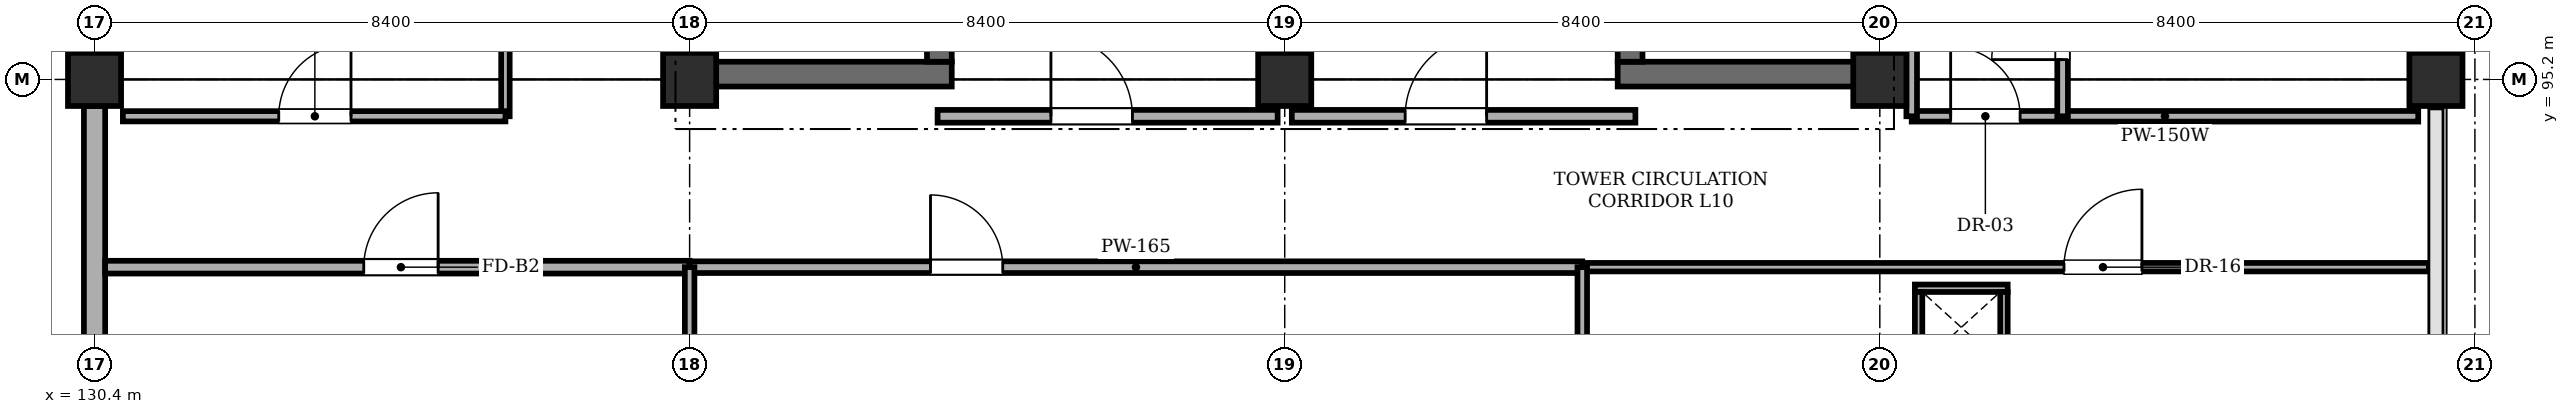
"""IFC4 building model, lengths in metres.
Left out: names, types, materials, properties, quantities, classifications, styles, units other than length and angle.
Written with IfcOpenShell. Run it as: python <this file> out.ifc"""

import sys

from ifc_helpers import new_model, si_unit, direction, frame, frame_2d, origin, origin_2d, place, context, subcontext, project, spatial, rectangle, extrude, element, fill, save


model = new_model("IFC4")
c1 = context("Model", 3, precision=1e-05, world=origin(), true_north=direction((0.0, 1.0)))
c2 = subcontext(c1, "Body", "Model", "MODEL_VIEW")
j1 = project(units=[si_unit("LENGTHUNIT", "METRE"), si_unit("PLANEANGLEUNIT", "RADIAN")], contexts=[c1])
p1 = place(None, origin())
s1 = spatial("IfcSite", under=j1, at=p1, CompositionType="ELEMENT")
p2 = place(p1, origin())
s2 = spatial("IfcBuilding", under=s1, at=p2, CompositionType="ELEMENT")
p3 = place(p2, frame((0.0, 0.0, 40.2)))
s3 = spatial("IfcBuildingStorey", under=s2, at=p3, CompositionType="ELEMENT", Elevation=40.2)
for number, where, z_axis, x_axis in (
    (1, (130.4, 95.2, 0.0), (0.0, 0.0, 1.0), (1.0, 0.0, 0.0)),
    (2, (138.8, 95.2, 0.0), (0.0, 0.0, 1.0), (1.0, 0.0, 0.0)),
    (3, (147.2, 95.2, 0.0), (0.0, 0.0, 1.0), (1.0, 0.0, 0.0)),
    (4, (155.6, 95.2, 0.0), (0.0, 0.0, 1.0), (1.0, 0.0, 0.0)),
    (5, (163.45, 95.2, 0.0), (0.0, 0.0, 1.0), (1.0, 0.0, 0.0)),
):
    element("IfcColumn", number, at=place(p3, frame(where, z_axis=z_axis, x_axis=x_axis)), inside=s3, PredefinedType="COLUMN", context=c2, shape_type="SweptSolid", body=[
        extrude(rectangle(XDim=0.75, YDim=0.75, at=origin_2d()), origin(), (0.0, 0.0, 1.0), 4.0),
    ])
p4 = place(p3, frame((138.7, 95.275, 0.0), z_axis=(0.0, 0.0, 1.0), x_axis=(1.0, 0.0, 0.0)))
e6 = element("IfcWall", 6, at=p4, inside=s3, PredefinedType="SHEAR", context=c2, shape_type="SweptSolid", body=[
    extrude(rectangle(XDim=3.8, YDim=0.35, at=frame_2d((1.9, 0.0))), origin(), (0.0, 0.0, 1.0), 4.0),
])
p5 = place(p3, frame((138.875, 95.45, 0.0), z_axis=(0.0, 0.0, 1.0), x_axis=(0.0, 1.0, 0.0)))
e7 = element("IfcWall", 7, at=p5, inside=s3, PredefinedType="SHEAR", context=c2, shape_type="SweptSolid", body=[
    extrude(rectangle(XDim=7.9, YDim=0.35, at=frame_2d((3.95, 0.0))), origin(), (0.0, 0.0, 1.0), 4.0),
])
p6 = place(p3, frame((142.325, 95.45, 0.0), z_axis=(0.0, 0.0, 1.0), x_axis=(0.0, 1.0, 0.0)))
e8 = element("IfcWall", 8, at=p6, inside=s3, PredefinedType="SHEAR", context=c2, shape_type="SweptSolid", body=[
    extrude(rectangle(XDim=7.9, YDim=0.35, at=frame_2d((3.95, 0.0))), origin(), (0.0, 0.0, 1.0), 4.0),
])
p7 = place(p6, frame((0.22, 0.0, 0.0)))
e9 = element("IfcOpeningElement", 9, at=p7, cuts=e8, PredefinedType="OPENING", context=c2, shape_type="SweptSolid", body=[
    extrude(rectangle(XDim=1.15, YDim=2.15, at=frame_2d((0.575, 1.075))), frame((0.0, 0.185, 0.0), z_axis=(0.0, -1.0, 0.0), x_axis=(1.0, 0.0, 0.0)), (0.0, 0.0, 1.0), 0.37),
])
p8 = place(p3, frame((151.9, 95.275, 0.0), z_axis=(0.0, 0.0, 1.0), x_axis=(1.0, 0.0, 0.0)))
e10 = element("IfcWall", 10, at=p8, inside=s3, PredefinedType="SHEAR", context=c2, shape_type="SweptSolid", body=[
    extrude(rectangle(XDim=3.8, YDim=0.35, at=frame_2d((1.9, 0.0))), origin(), (0.0, 0.0, 1.0), 4.0),
])
p9 = place(p3, frame((152.075, 95.45, 0.0), z_axis=(0.0, 0.0, 1.0), x_axis=(0.0, 1.0, 0.0)))
e11 = element("IfcWall", 11, at=p9, inside=s3, PredefinedType="SHEAR", context=c2, shape_type="SweptSolid", body=[
    extrude(rectangle(XDim=7.9, YDim=0.35, at=frame_2d((3.95, 0.0))), origin(), (0.0, 0.0, 1.0), 4.0),
])
p10 = place(p9, frame((0.35, 0.0, 0.0)))
e12 = element("IfcOpeningElement", 12, at=p10, cuts=e11, PredefinedType="OPENING", context=c2, shape_type="SweptSolid", body=[
    extrude(rectangle(XDim=1.15, YDim=2.15, at=frame_2d((0.575, 1.075))), frame((0.0, 0.185, 0.0), z_axis=(0.0, -1.0, 0.0), x_axis=(1.0, 0.0, 0.0)), (0.0, 0.0, 1.0), 0.37),
])
p11 = place(p3, frame((155.525, 95.45, 0.0), z_axis=(0.0, 0.0, 1.0), x_axis=(0.0, 1.0, 0.0)))
e13 = element("IfcWall", 13, at=p11, inside=s3, PredefinedType="SHEAR", context=c2, shape_type="SweptSolid", body=[
    extrude(rectangle(XDim=7.9, YDim=0.35, at=frame_2d((3.95, 0.0))), origin(), (0.0, 0.0, 1.0), 4.0),
])
p12 = place(p3, frame((163.45, 103.225, 0.0), z_axis=(0.0, 0.0, 1.0), x_axis=(0.0, -1.0, 0.0)))
e14 = element("IfcWall", 14, at=p12, inside=s3, PredefinedType="STANDARD", context=c2, shape_type="SweptSolid", body=[
    extrude(rectangle(XDim=7.65, YDim=0.3, at=frame_2d((3.825, 0.0))), origin(), (0.0, 0.0, 1.0), 3.3),
])
p13 = place(p12, frame((1.15, 0.0, 1.1)))
e15 = element("IfcOpeningElement", 15, at=p13, cuts=e14, PredefinedType="OPENING", context=c2, shape_type="SweptSolid", body=[
    extrude(rectangle(XDim=1.4, YDim=1.4, at=frame_2d((0.7, 0.7))), frame((0.0, 0.16, 0.0), z_axis=(0.0, -1.0, 0.0), x_axis=(1.0, 0.0, 0.0)), (0.0, 0.0, 1.0), 0.32),
])
p14 = place(p3, frame((130.4, 87.175, 0.0), z_axis=(0.0, 0.0, 1.0), x_axis=(0.0, 1.0, 0.0)))
e16 = element("IfcWall", 16, at=p14, inside=s3, PredefinedType="STANDARD", context=c2, shape_type="SweptSolid", body=[
    extrude(rectangle(XDim=7.65, YDim=0.3, at=frame_2d((3.825, 0.0))), origin(), (0.0, 0.0, 1.0), 3.3),
])
p15 = place(p14, frame((2.4, 0.0, 0.95)))
e17 = element("IfcOpeningElement", 17, at=p15, cuts=e16, PredefinedType="OPENING", context=c2, shape_type="SweptSolid", body=[
    extrude(rectangle(XDim=1.5, YDim=1.8, at=frame_2d((0.75, 0.9))), frame((0.0, 0.16, 0.0), z_axis=(0.0, -1.0, 0.0), x_axis=(1.0, 0.0, 0.0)), (0.0, 0.0, 1.0), 0.32),
])
p16 = place(p3, frame((130.4, 95.575, 0.0), z_axis=(0.0, 0.0, 1.0), x_axis=(0.0, 1.0, 0.0)))
e18 = element("IfcWall", 18, at=p16, inside=s3, PredefinedType="STANDARD", context=c2, shape_type="SweptSolid", body=[
    extrude(rectangle(XDim=7.65, YDim=0.3, at=frame_2d((3.825, 0.0))), origin(), (0.0, 0.0, 1.0), 3.3),
])
p17 = place(p16, frame((2.4, 0.0, 1.0)))
e19 = element("IfcOpeningElement", 19, at=p17, cuts=e18, PredefinedType="OPENING", context=c2, shape_type="SweptSolid", body=[
    extrude(rectangle(XDim=1.8, YDim=1.8, at=frame_2d((0.9, 0.9))), frame((0.0, 0.16, 0.0), z_axis=(0.0, -1.0, 0.0), x_axis=(1.0, 0.0, 0.0)), (0.0, 0.0, 1.0), 0.32),
])
p18 = place(p3, frame((142.3, 94.68, 0.0), z_axis=(0.0, 0.0, 1.0), x_axis=(1.0, 0.0, 0.0)))
e20 = element("IfcWall", 20, at=p18, inside=s3, PredefinedType="STANDARD", context=c2, shape_type="SweptSolid", body=[
    extrude(rectangle(XDim=4.8, YDim=0.18, at=frame_2d((2.4, 0.0))), origin(), (0.0, 0.0, 1.0), 4.0),
])
p19 = place(p18, frame((1.6, 0.0, 0.0)))
e21 = element("IfcOpeningElement", 21, at=p19, cuts=e20, PredefinedType="OPENING", context=c2, shape_type="SweptSolid", body=[
    extrude(rectangle(XDim=1.15, YDim=2.15, at=frame_2d((0.575, 1.075))), frame((0.0, 0.1, 0.0), z_axis=(0.0, -1.0, 0.0), x_axis=(1.0, 0.0, 0.0)), (0.0, 0.0, 1.0), 0.2),
])
p20 = place(p3, frame((147.3, 94.68, 0.0), z_axis=(0.0, 0.0, 1.0), x_axis=(1.0, 0.0, 0.0)))
e22 = element("IfcWall", 22, at=p20, inside=s3, PredefinedType="STANDARD", context=c2, shape_type="SweptSolid", body=[
    extrude(rectangle(XDim=4.85, YDim=0.18, at=frame_2d((2.425, 0.0))), origin(), (0.0, 0.0, 1.0), 4.0),
])
p21 = place(p20, frame((1.6, 0.0, 0.0)))
e23 = element("IfcOpeningElement", 23, at=p21, cuts=e22, PredefinedType="OPENING", context=c2, shape_type="SweptSolid", body=[
    extrude(rectangle(XDim=1.15, YDim=2.15, at=frame_2d((0.575, 1.075))), frame((0.0, 0.1, 0.0), z_axis=(0.0, -1.0, 0.0), x_axis=(1.0, 0.0, 0.0)), (0.0, 0.0, 1.0), 0.2),
])
p22 = place(p3, frame((156.05, 94.68, 0.0), z_axis=(0.0, 0.0, 1.0), x_axis=(1.0, 0.0, 0.0)))
e24 = element("IfcWall", 24, at=p22, inside=s3, PredefinedType="PARTITIONING", context=c2, shape_type="SweptSolid", body=[
    extrude(rectangle(XDim=7.15, YDim=0.15, at=frame_2d((3.575, 0.0))), origin(), (0.0, 0.0, 1.0), 4.0),
])
p23 = place(p22, frame((0.55, 0.0, 0.0)))
e25 = element("IfcOpeningElement", 25, at=p23, cuts=e24, PredefinedType="OPENING", context=c2, shape_type="SweptSolid", body=[
    extrude(rectangle(XDim=0.98, YDim=2.12, at=frame_2d((0.49, 1.06))), frame((0.0, 0.085, 0.0), z_axis=(0.0, -1.0, 0.0), x_axis=(1.0, 0.0, 0.0)), (0.0, 0.0, 1.0), 0.17),
])
p24 = place(p3, frame((158.18, 94.68, 0.0), z_axis=(0.0, 0.0, 1.0), x_axis=(0.0, 1.0, 0.0)))
e26 = element("IfcWall", 26, at=p24, inside=s3, PredefinedType="PARTITIONING", context=c2, shape_type="SweptSolid", body=[
    extrude(rectangle(XDim=8.57, YDim=0.15, at=frame_2d((4.285, 0.0))), origin(), (0.0, 0.0, 1.0), 4.0),
])
p25 = place(p24, frame((0.8, 0.0, 0.0)))
e27 = element("IfcOpeningElement", 27, at=p25, cuts=e26, PredefinedType="OPENING", context=c2, shape_type="SweptSolid", body=[
    extrude(rectangle(XDim=1.0, YDim=2.12, at=frame_2d((0.5, 1.06))), frame((0.0, 0.085, 0.0), z_axis=(0.0, -1.0, 0.0), x_axis=(1.0, 0.0, 0.0)), (0.0, 0.0, 1.0), 0.17),
])
p26 = place(p24, frame((3.5, 0.0, 0.0)))
e28 = element("IfcOpeningElement", 28, at=p26, cuts=e26, PredefinedType="OPENING", context=c2, shape_type="SweptSolid", body=[
    extrude(rectangle(XDim=0.92, YDim=2.1, at=frame_2d((0.46, 1.05))), frame((0.0, 0.085, 0.0), z_axis=(0.0, -1.0, 0.0), x_axis=(1.0, 0.0, 0.0)), (0.0, 0.0, 1.0), 0.17),
])
p27 = place(p24, frame((6.4, 0.0, 0.0)))
e29 = element("IfcOpeningElement", 29, at=p27, cuts=e26, PredefinedType="OPENING", context=c2, shape_type="SweptSolid", body=[
    extrude(rectangle(XDim=0.92, YDim=2.1, at=frame_2d((0.46, 1.05))), frame((0.0, 0.085, 0.0), z_axis=(0.0, -1.0, 0.0), x_axis=(1.0, 0.0, 0.0)), (0.0, 0.0, 1.0), 0.17),
])
p28 = place(p3, frame((156.05, 94.68, 0.0), z_axis=(0.0, 0.0, 1.0), x_axis=(0.0, 1.0, 0.0)))
e30 = element("IfcWall", 30, at=p28, inside=s3, PredefinedType="PARTITIONING", context=c2, shape_type="SweptSolid", body=[
    extrude(rectangle(XDim=8.57, YDim=0.15, at=frame_2d((4.285, 0.0))), origin(), (0.0, 0.0, 1.0), 4.0),
])
p29 = place(p3, frame((136.2, 94.68, 0.0), z_axis=(0.0, 0.0, 1.0), x_axis=(0.0, 1.0, 0.0)))
e31 = element("IfcWall", 31, at=p29, inside=s3, PredefinedType="PARTITIONING", context=c2, shape_type="SweptSolid", body=[
    extrude(rectangle(XDim=9.07, YDim=0.12, at=frame_2d((4.535, 0.0))), origin(), (0.0, 0.0, 1.0), 4.0),
])
p30 = place(p3, frame((130.8, 94.68, 0.0), z_axis=(0.0, 0.0, 1.0), x_axis=(1.0, 0.0, 0.0)))
e32 = element("IfcWall", 32, at=p30, inside=s3, PredefinedType="PARTITIONING", context=c2, shape_type="SweptSolid", body=[
    extrude(rectangle(XDim=5.4, YDim=0.145, at=frame_2d((2.7, 0.0))), origin(), (0.0, 0.0, 1.0), 4.0),
])
p31 = place(p30, frame((2.2, 0.0, 0.0)))
e33 = element("IfcOpeningElement", 33, at=p31, cuts=e32, PredefinedType="OPENING", context=c2, shape_type="SweptSolid", body=[
    extrude(rectangle(XDim=1.02, YDim=2.15, at=frame_2d((0.51, 1.075))), frame((0.0, 0.083, 0.0), z_axis=(0.0, -1.0, 0.0), x_axis=(1.0, 0.0, 0.0)), (0.0, 0.0, 1.0), 0.165),
])
p32 = place(p3, frame((130.55, 92.55, 0.0), z_axis=(0.0, 0.0, 1.0), x_axis=(1.0, 0.0, 0.0)))
e34 = element("IfcWall", 34, at=p32, inside=s3, PredefinedType="STANDARD", context=c2, shape_type="SweptSolid", body=[
    extrude(rectangle(XDim=8.25, YDim=0.18, at=frame_2d((4.125, 0.0))), origin(), (0.0, 0.0, 1.0), 4.0),
])
p33 = place(p32, frame((3.65, 0.0, 0.0)))
e35 = element("IfcOpeningElement", 35, at=p33, cuts=e34, PredefinedType="OPENING", context=c2, shape_type="SweptSolid", body=[
    extrude(rectangle(XDim=1.05, YDim=2.15, at=frame_2d((0.525, 1.075))), frame((0.0, 0.1, 0.0), z_axis=(0.0, -1.0, 0.0), x_axis=(1.0, 0.0, 0.0)), (0.0, 0.0, 1.0), 0.2),
])
p34 = place(p3, frame((138.8, 92.55, 0.0), z_axis=(0.0, 0.0, 1.0), x_axis=(1.0, 0.0, 0.0)))
e36 = element("IfcWall", 36, at=p34, inside=s3, PredefinedType="PARTITIONING", context=c2, shape_type="SweptSolid", body=[
    extrude(rectangle(XDim=12.6, YDim=0.165, at=frame_2d((6.3, 0.0))), origin(), (0.0, 0.0, 1.0), 4.0),
])
p35 = place(p34, frame((3.4, 0.0, 0.0)))
e37 = element("IfcOpeningElement", 37, at=p35, cuts=e36, PredefinedType="OPENING", context=c2, shape_type="SweptSolid", body=[
    extrude(rectangle(XDim=1.02, YDim=2.15, at=frame_2d((0.51, 1.075))), frame((0.0, 0.093, 0.0), z_axis=(0.0, -1.0, 0.0), x_axis=(1.0, 0.0, 0.0)), (0.0, 0.0, 1.0), 0.185),
])
p36 = place(p3, frame((138.8, 78.55, 0.0), z_axis=(0.0, 0.0, 1.0), x_axis=(0.0, 1.0, 0.0)))
e38 = element("IfcWall", 38, at=p36, inside=s3, PredefinedType="PARTITIONING", context=c2, shape_type="SweptSolid", body=[
    extrude(rectangle(XDim=14.0, YDim=0.135, at=frame_2d((7.0, 0.0))), origin(), (0.0, 0.0, 1.0), 3.3),
])
p37 = place(p3, frame((151.4, 92.55, 0.0), z_axis=(0.0, 0.0, 1.0), x_axis=(1.0, 0.0, 0.0)))
e39 = element("IfcWall", 39, at=p37, inside=s3, PredefinedType="PARTITIONING", context=c2, shape_type="SweptSolid", body=[
    extrude(rectangle(XDim=11.95, YDim=0.12, at=frame_2d((5.975, 0.0))), origin(), (0.0, 0.0, 1.0), 4.0),
])
p38 = place(p37, frame((6.8, 0.0, 0.0)))
e40 = element("IfcOpeningElement", 40, at=p38, cuts=e39, PredefinedType="OPENING", context=c2, shape_type="SweptSolid", body=[
    extrude(rectangle(XDim=1.1, YDim=2.18, at=frame_2d((0.55, 1.09))), frame((0.0, 0.07, 0.0), z_axis=(0.0, -1.0, 0.0), x_axis=(1.0, 0.0, 0.0)), (0.0, 0.0, 1.0), 0.14),
])
p39 = place(p3, frame((151.4, 78.55, 0.0), z_axis=(0.0, 0.0, 1.0), x_axis=(0.0, 1.0, 0.0)))
e41 = element("IfcWall", 41, at=p39, inside=s3, PredefinedType="PARTITIONING", context=c2, shape_type="SweptSolid", body=[
    extrude(rectangle(XDim=14.0, YDim=0.135, at=frame_2d((7.0, 0.0))), origin(), (0.0, 0.0, 1.0), 3.55),
])
p40 = place(p3, frame((156.095, 92.252, 0.0), z_axis=(0.0, 0.0, 1.0), x_axis=(1.0, 0.0, 0.0)))
e42 = element("IfcWall", 42, at=p40, inside=s3, PredefinedType="PARTITIONING", context=c2, shape_type="SweptSolid", body=[
    extrude(rectangle(XDim=1.31, YDim=0.105, at=frame_2d((0.655, 0.0))), origin(), (0.0, 0.0, 1.0), 4.0),
])
for number, where, z_axis, x_axis in (
    (43, (156.147, 91.2, 0.0), (0.0, 0.0, 1.0), (0.0, 1.0, 0.0)),
    (44, (157.353, 91.2, 0.0), (0.0, 0.0, 1.0), (0.0, 1.0, 0.0)),
):
    element("IfcWall", number, at=place(p3, frame(where, z_axis=z_axis, x_axis=x_axis)), inside=s3, PredefinedType="PARTITIONING", context=c2, shape_type="SweptSolid", body=[
        extrude(rectangle(XDim=1.0, YDim=0.105, at=frame_2d((0.5, 0.0))), origin(), (0.0, 0.0, 1.0), 4.0),
    ])
p41 = place(p19, origin())
e45 = element("IfcDoor", 45, at=p41, inside=s3, OperationType="SINGLE_SWING_LEFT", PredefinedType="DOOR", context=c2, shape_type="SweptSolid", body=[
    extrude(rectangle(XDim=1.15, YDim=2.15, at=frame_2d((0.575, 1.075))), frame((0.0, 0.025, 0.0), z_axis=(0.0, -1.0, 0.0), x_axis=(1.0, 0.0, 0.0)), (0.0, 0.0, 1.0), 0.05),
])
fill(e21, e45)
p42 = place(p21, origin())
e46 = element("IfcDoor", 46, at=p42, inside=s3, OperationType="SINGLE_SWING_RIGHT", PredefinedType="DOOR", context=c2, shape_type="SweptSolid", body=[
    extrude(rectangle(XDim=1.15, YDim=2.15, at=frame_2d((0.575, 1.075))), frame((0.0, 0.025, 0.0), z_axis=(0.0, -1.0, 0.0), x_axis=(1.0, 0.0, 0.0)), (0.0, 0.0, 1.0), 0.05),
])
fill(e23, e46)
p43 = place(p23, origin())
e47 = element("IfcDoor", 47, at=p43, inside=s3, OperationType="SINGLE_SWING_LEFT", PredefinedType="DOOR", context=c2, shape_type="SweptSolid", body=[
    extrude(rectangle(XDim=0.98, YDim=2.12, at=frame_2d((0.49, 1.06))), frame((0.0, 0.025, 0.0), z_axis=(0.0, -1.0, 0.0), x_axis=(1.0, 0.0, 0.0)), (0.0, 0.0, 1.0), 0.05),
])
fill(e25, e47)
p44 = place(p25, origin())
e48 = element("IfcDoor", 48, at=p44, inside=s3, OperationType="SINGLE_SWING_LEFT", PredefinedType="DOOR", context=c2, shape_type="SweptSolid", body=[
    extrude(rectangle(XDim=1.0, YDim=2.12, at=frame_2d((0.5, 1.06))), frame((0.0, 0.025, 0.0), z_axis=(0.0, -1.0, 0.0), x_axis=(1.0, 0.0, 0.0)), (0.0, 0.0, 1.0), 0.05),
])
fill(e27, e48)
p45 = place(p31, origin())
e49 = element("IfcDoor", 49, at=p45, inside=s3, OperationType="SINGLE_SWING_RIGHT", PredefinedType="DOOR", context=c2, shape_type="SweptSolid", body=[
    extrude(rectangle(XDim=1.02, YDim=2.15, at=frame_2d((0.51, 1.075))), frame((0.0, 0.025, 0.0), z_axis=(0.0, -1.0, 0.0), x_axis=(1.0, 0.0, 0.0)), (0.0, 0.0, 1.0), 0.05),
])
fill(e33, e49)
p46 = place(p33, origin())
e50 = element("IfcDoor", 50, at=p46, inside=s3, OperationType="SINGLE_SWING_RIGHT", PredefinedType="DOOR", context=c2, shape_type="SweptSolid", body=[
    extrude(rectangle(XDim=1.05, YDim=2.15, at=frame_2d((0.525, 1.075))), frame((0.0, 0.025, 0.0), z_axis=(0.0, -1.0, 0.0), x_axis=(1.0, 0.0, 0.0)), (0.0, 0.0, 1.0), 0.05),
])
fill(e35, e50)
p47 = place(p35, origin())
e51 = element("IfcDoor", 51, at=p47, inside=s3, OperationType="SINGLE_SWING_LEFT", PredefinedType="DOOR", context=c2, shape_type="SweptSolid", body=[
    extrude(rectangle(XDim=1.02, YDim=2.15, at=frame_2d((0.51, 1.075))), frame((0.0, 0.025, 0.0), z_axis=(0.0, -1.0, 0.0), x_axis=(1.0, 0.0, 0.0)), (0.0, 0.0, 1.0), 0.05),
])
fill(e37, e51)
p48 = place(p38, origin())
e52 = element("IfcDoor", 52, at=p48, inside=s3, OperationType="SINGLE_SWING_RIGHT", PredefinedType="DOOR", context=c2, shape_type="SweptSolid", body=[
    extrude(rectangle(XDim=1.1, YDim=2.18, at=frame_2d((0.55, 1.09))), frame((0.0, 0.025, 0.0), z_axis=(0.0, -1.0, 0.0), x_axis=(1.0, 0.0, 0.0)), (0.0, 0.0, 1.0), 0.05),
])
fill(e40, e52)
save(model, sys.argv[1])
